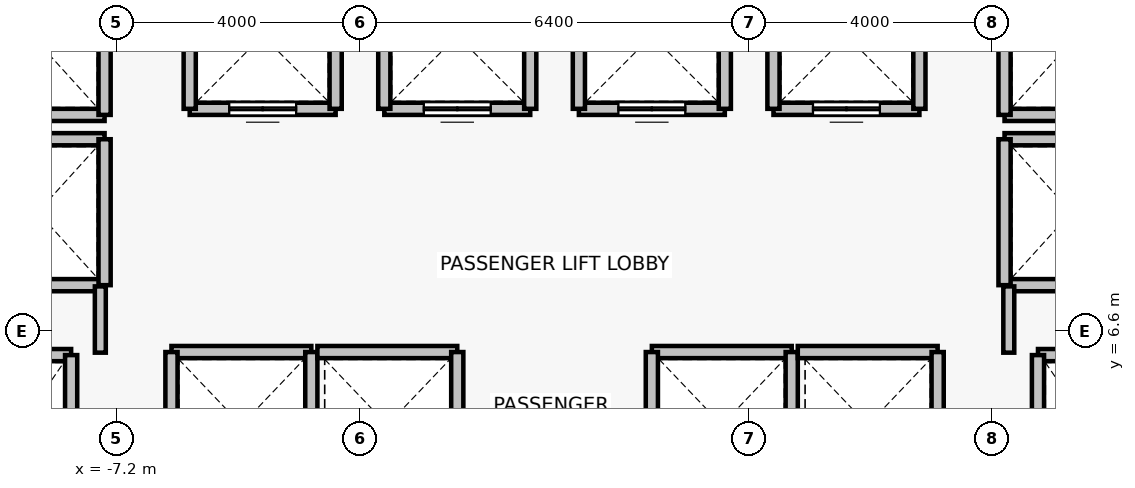
"""IFC4 building model, lengths in metres.
Left out: names, types, materials, properties, quantities, classifications, styles, units other than length and angle.
Written with IfcOpenShell. Run it as: python <this file> out.ifc"""

import sys

from ifc_helpers import new_model, si_unit, direction, frame, frame_2d, origin, place, context, subcontext, project, spatial, rectangle, extrude, source, transform, mapped, element, fill, save


model = new_model("IFC4")
c1 = context("Model", 3, precision=1e-05, world=origin(), true_north=direction((0.0, 1.0)))
c2 = subcontext(c1, "Body", "Model", "MODEL_VIEW")
j1 = project(units=[si_unit("LENGTHUNIT", "METRE"), si_unit("PLANEANGLEUNIT", "RADIAN")], contexts=[c1])
p1 = place(None, origin())
s1 = spatial("IfcSite", under=j1, at=p1, CompositionType="ELEMENT")
p2 = place(p1, origin())
s2 = spatial("IfcBuilding", under=s1, at=p2, CompositionType="ELEMENT")
p3 = place(p2, frame((0.0, 0.0, 37.3)))
s3 = spatial("IfcBuildingStorey", under=s2, at=p3, CompositionType="ELEMENT", Elevation=37.3)
p4 = place(p3, frame((-9.95, 6.2, 0.0), z_axis=(0.0, 0.0, 1.0), x_axis=(1.0, 0.0, 0.0)))
e1 = element("IfcWall", 1, at=p4, inside=s3, PredefinedType="SOLIDWALL", context=c2, shape_type="SweptSolid", body=[
    extrude(rectangle(XDim=2.0, YDim=0.2, at=frame_2d((1.0, 0.0))), origin(), (0.0, 0.0, 1.0), 3.075),
])
p5 = place(p3, frame((-7.95, 6.2, 0.0), z_axis=(0.0, 0.0, 1.0), x_axis=(0.0, -1.0, 0.0)))
e2 = element("IfcWall", 2, at=p5, inside=s3, PredefinedType="SOLIDWALL", context=c2, shape_type="SweptSolid", body=[
    extrude(rectangle(XDim=2.8, YDim=0.2, at=frame_2d((1.4, 0.0))), origin(), (0.0, 0.0, 1.0), 3.075),
])
p6 = place(p3, frame((7.95, 6.2, 0.0), z_axis=(0.0, 0.0, 1.0), x_axis=(1.0, 0.0, 0.0)))
e3 = element("IfcWall", 3, at=p6, inside=s3, PredefinedType="SOLIDWALL", context=c2, shape_type="SweptSolid", body=[
    extrude(rectangle(XDim=2.0, YDim=0.2, at=frame_2d((1.0, 0.0))), origin(), (0.0, 0.0, 1.0), 3.075),
])
p7 = place(p3, frame((7.95, 3.4, 0.0), z_axis=(0.0, 0.0, 1.0), x_axis=(0.0, 1.0, 0.0)))
e4 = element("IfcWall", 4, at=p7, inside=s3, PredefinedType="SOLIDWALL", context=c2, shape_type="SweptSolid", body=[
    extrude(rectangle(XDim=2.8, YDim=0.2, at=frame_2d((1.4, 0.0))), origin(), (0.0, 0.0, 1.0), 3.075),
])
p8 = place(p3, frame((-3.6, 10.25, 0.0), z_axis=(0.0, 0.0, 1.0), x_axis=(-1.0, 0.0, 0.0)))
e5 = element("IfcWall", 5, at=p8, inside=s3, PredefinedType="SOLIDWALL", context=c2, shape_type="SweptSolid", body=[
    extrude(rectangle(XDim=2.4, YDim=0.2, at=frame_2d((1.2, 0.0))), origin(), (0.0, 0.0, 1.0), 3.075),
])
p9 = place(p8, frame((0.65, 0.0, 0.0)))
e6 = element("IfcOpeningElement", 6, at=p9, cuts=e5, PredefinedType="OPENING", context=c2, shape_type="SweptSolid", body=[
    extrude(rectangle(XDim=1.1, YDim=2.2, at=frame_2d((0.55, 1.1))), frame((0.0, 0.11, 0.0), z_axis=(0.0, -1.0, 0.0), x_axis=(1.0, 0.0, 0.0)), (0.0, 0.0, 1.0), 0.22),
])
for number, where, z_axis, x_axis in (
    (7, (-6.0, 10.25, 0.0), (0.0, 0.0, 1.0), (0.0, 1.0, 0.0)),
    (8, (-3.6, 12.65, 0.0), (0.0, 0.0, 1.0), (0.0, -1.0, 0.0)),
):
    element("IfcWall", number, at=place(p3, frame(where, z_axis=z_axis, x_axis=x_axis)), inside=s3, PredefinedType="SOLIDWALL", context=c2, shape_type="SweptSolid", body=[
        extrude(rectangle(XDim=2.4, YDim=0.2, at=frame_2d((1.2, 0.0))), origin(), (0.0, 0.0, 1.0), 3.075),
    ])
p10 = place(p3, frame((-0.4, 10.25, 0.0), z_axis=(0.0, 0.0, 1.0), x_axis=(-1.0, 0.0, 0.0)))
e9 = element("IfcWall", 9, at=p10, inside=s3, PredefinedType="SOLIDWALL", context=c2, shape_type="SweptSolid", body=[
    extrude(rectangle(XDim=2.4, YDim=0.2, at=frame_2d((1.2, 0.0))), origin(), (0.0, 0.0, 1.0), 3.075),
])
p11 = place(p10, frame((0.65, 0.0, 0.0)))
e10 = element("IfcOpeningElement", 10, at=p11, cuts=e9, PredefinedType="OPENING", context=c2, shape_type="SweptSolid", body=[
    extrude(rectangle(XDim=1.1, YDim=2.2, at=frame_2d((0.55, 1.1))), frame((0.0, 0.11, 0.0), z_axis=(0.0, -1.0, 0.0), x_axis=(1.0, 0.0, 0.0)), (0.0, 0.0, 1.0), 0.22),
])
for number, where, z_axis, x_axis in (
    (11, (-2.8, 10.25, 0.0), (0.0, 0.0, 1.0), (0.0, 1.0, 0.0)),
    (12, (-0.4, 12.65, 0.0), (0.0, 0.0, 1.0), (0.0, -1.0, 0.0)),
):
    element("IfcWall", number, at=place(p3, frame(where, z_axis=z_axis, x_axis=x_axis)), inside=s3, PredefinedType="SOLIDWALL", context=c2, shape_type="SweptSolid", body=[
        extrude(rectangle(XDim=2.4, YDim=0.2, at=frame_2d((1.2, 0.0))), origin(), (0.0, 0.0, 1.0), 3.075),
    ])
p12 = place(p3, frame((2.8, 10.25, 0.0), z_axis=(0.0, 0.0, 1.0), x_axis=(-1.0, 0.0, 0.0)))
e13 = element("IfcWall", 13, at=p12, inside=s3, PredefinedType="SOLIDWALL", context=c2, shape_type="SweptSolid", body=[
    extrude(rectangle(XDim=2.4, YDim=0.2, at=frame_2d((1.2, 0.0))), origin(), (0.0, 0.0, 1.0), 3.075),
])
p13 = place(p12, frame((0.65, 0.0, 0.0)))
e14 = element("IfcOpeningElement", 14, at=p13, cuts=e13, PredefinedType="OPENING", context=c2, shape_type="SweptSolid", body=[
    extrude(rectangle(XDim=1.1, YDim=2.2, at=frame_2d((0.55, 1.1))), frame((0.0, 0.11, 0.0), z_axis=(0.0, -1.0, 0.0), x_axis=(1.0, 0.0, 0.0)), (0.0, 0.0, 1.0), 0.22),
])
for number, where, z_axis, x_axis in (
    (15, (0.4, 10.25, 0.0), (0.0, 0.0, 1.0), (0.0, 1.0, 0.0)),
    (16, (2.8, 12.65, 0.0), (0.0, 0.0, 1.0), (0.0, -1.0, 0.0)),
):
    element("IfcWall", number, at=place(p3, frame(where, z_axis=z_axis, x_axis=x_axis)), inside=s3, PredefinedType="SOLIDWALL", context=c2, shape_type="SweptSolid", body=[
        extrude(rectangle(XDim=2.4, YDim=0.2, at=frame_2d((1.2, 0.0))), origin(), (0.0, 0.0, 1.0), 3.075),
    ])
p14 = place(p3, frame((6.0, 10.25, 0.0), z_axis=(0.0, 0.0, 1.0), x_axis=(-1.0, 0.0, 0.0)))
e17 = element("IfcWall", 17, at=p14, inside=s3, PredefinedType="SOLIDWALL", context=c2, shape_type="SweptSolid", body=[
    extrude(rectangle(XDim=2.4, YDim=0.2, at=frame_2d((1.2, 0.0))), origin(), (0.0, 0.0, 1.0), 3.075),
])
p15 = place(p14, frame((0.65, 0.0, 0.0)))
e18 = element("IfcOpeningElement", 18, at=p15, cuts=e17, PredefinedType="OPENING", context=c2, shape_type="SweptSolid", body=[
    extrude(rectangle(XDim=1.1, YDim=2.2, at=frame_2d((0.55, 1.1))), frame((0.0, 0.11, 0.0), z_axis=(0.0, -1.0, 0.0), x_axis=(1.0, 0.0, 0.0)), (0.0, 0.0, 1.0), 0.22),
])
for number, where, z_axis, x_axis in (
    (19, (3.6, 10.25, 0.0), (0.0, 0.0, 1.0), (0.0, 1.0, 0.0)),
    (20, (6.0, 12.65, 0.0), (0.0, 0.0, 1.0), (0.0, -1.0, 0.0)),
):
    element("IfcWall", number, at=place(p3, frame(where, z_axis=z_axis, x_axis=x_axis)), inside=s3, PredefinedType="SOLIDWALL", context=c2, shape_type="SweptSolid", body=[
        extrude(rectangle(XDim=2.4, YDim=0.2, at=frame_2d((1.2, 0.0))), origin(), (0.0, 0.0, 1.0), 3.075),
    ])
p16 = place(p3, frame((-6.3, 6.25, 0.0), z_axis=(0.0, 0.0, 1.0), x_axis=(1.0, 0.0, 0.0)))
e21 = element("IfcWall", 21, at=p16, inside=s3, PredefinedType="SOLIDWALL", context=c2, shape_type="SweptSolid", body=[
    extrude(rectangle(XDim=2.3, YDim=0.2, at=frame_2d((1.15, 0.0))), origin(), (0.0, 0.0, 1.0), 3.075),
])
for number, where, z_axis, x_axis in (
    (22, (-6.3, 3.85, 0.0), (0.0, 0.0, 1.0), (0.0, 1.0, 0.0)),
    (23, (-4.0, 6.25, 0.0), (0.0, 0.0, 1.0), (0.0, -1.0, 0.0)),
):
    element("IfcWall", number, at=place(p3, frame(where, z_axis=z_axis, x_axis=x_axis)), inside=s3, PredefinedType="SOLIDWALL", context=c2, shape_type="SweptSolid", body=[
        extrude(rectangle(XDim=2.4, YDim=0.2, at=frame_2d((1.2, 0.0))), origin(), (0.0, 0.0, 1.0), 3.075),
    ])
p17 = place(p3, frame((-3.9, 6.25, 0.0), z_axis=(0.0, 0.0, 1.0), x_axis=(1.0, 0.0, 0.0)))
e24 = element("IfcWall", 24, at=p17, inside=s3, PredefinedType="SOLIDWALL", context=c2, shape_type="SweptSolid", body=[
    extrude(rectangle(XDim=2.3, YDim=0.2, at=frame_2d((1.15, 0.0))), origin(), (0.0, 0.0, 1.0), 3.075),
])
p18 = place(p3, frame((-1.6, 6.25, 0.0), z_axis=(0.0, 0.0, 1.0), x_axis=(0.0, -1.0, 0.0)))
e25 = element("IfcWall", 25, at=p18, inside=s3, PredefinedType="SOLIDWALL", context=c2, shape_type="SweptSolid", body=[
    extrude(rectangle(XDim=2.4, YDim=0.2, at=frame_2d((1.2, 0.0))), origin(), (0.0, 0.0, 1.0), 3.075),
])
p19 = place(p3, frame((1.6, 6.25, 0.0), z_axis=(0.0, 0.0, 1.0), x_axis=(1.0, 0.0, 0.0)))
e26 = element("IfcWall", 26, at=p19, inside=s3, PredefinedType="SOLIDWALL", context=c2, shape_type="SweptSolid", body=[
    extrude(rectangle(XDim=2.3, YDim=0.2, at=frame_2d((1.15, 0.0))), origin(), (0.0, 0.0, 1.0), 3.075),
])
for number, where, z_axis, x_axis in (
    (27, (1.6, 3.85, 0.0), (0.0, 0.0, 1.0), (0.0, 1.0, 0.0)),
    (28, (3.9, 6.25, 0.0), (0.0, 0.0, 1.0), (0.0, -1.0, 0.0)),
):
    element("IfcWall", number, at=place(p3, frame(where, z_axis=z_axis, x_axis=x_axis)), inside=s3, PredefinedType="SOLIDWALL", context=c2, shape_type="SweptSolid", body=[
        extrude(rectangle(XDim=2.4, YDim=0.2, at=frame_2d((1.2, 0.0))), origin(), (0.0, 0.0, 1.0), 3.075),
    ])
p20 = place(p3, frame((4.0, 6.25, 0.0), z_axis=(0.0, 0.0, 1.0), x_axis=(1.0, 0.0, 0.0)))
e29 = element("IfcWall", 29, at=p20, inside=s3, PredefinedType="SOLIDWALL", context=c2, shape_type="SweptSolid", body=[
    extrude(rectangle(XDim=2.3, YDim=0.2, at=frame_2d((1.15, 0.0))), origin(), (0.0, 0.0, 1.0), 3.075),
])
p21 = place(p3, frame((6.3, 6.25, 0.0), z_axis=(0.0, 0.0, 1.0), x_axis=(0.0, -1.0, 0.0)))
e30 = element("IfcWall", 30, at=p21, inside=s3, PredefinedType="SOLIDWALL", context=c2, shape_type="SweptSolid", body=[
    extrude(rectangle(XDim=2.4, YDim=0.2, at=frame_2d((1.2, 0.0))), origin(), (0.0, 0.0, 1.0), 3.075),
])
for number, where, z_axis, x_axis in (
    (31, (-7.4, 7.35, 0.0), (0.0, 0.0, 1.0), (-1.0, 0.0, 0.0)),
    (32, (-9.6, 9.75, 0.0), (0.0, 0.0, 1.0), (1.0, 0.0, 0.0)),
):
    element("IfcWall", number, at=place(p3, frame(where, z_axis=z_axis, x_axis=x_axis)), inside=s3, PredefinedType="SOLIDWALL", context=c2, shape_type="SweptSolid", body=[
        extrude(rectangle(XDim=2.2, YDim=0.2, at=frame_2d((1.1, 0.0))), origin(), (0.0, 0.0, 1.0), 2.465),
    ])
p22 = place(p3, frame((-7.4, 9.75, 0.0), z_axis=(0.0, 0.0, 1.0), x_axis=(0.0, -1.0, 0.0)))
e33 = element("IfcWall", 33, at=p22, inside=s3, PredefinedType="SOLIDWALL", context=c2, shape_type="SweptSolid", body=[
    extrude(rectangle(XDim=2.4, YDim=0.2, at=frame_2d((1.2, 0.0))), origin(), (0.0, 0.0, 1.0), 2.465),
])
p23 = place(p3, frame((-7.4, 10.15, 0.0), z_axis=(0.0, 0.0, 1.0), x_axis=(-1.0, 0.0, 0.0)))
e34 = element("IfcWall", 34, at=p23, inside=s3, PredefinedType="SOLIDWALL", context=c2, shape_type="SweptSolid", body=[
    extrude(rectangle(XDim=2.2, YDim=0.2, at=frame_2d((1.1, 0.0))), origin(), (0.0, 0.0, 1.0), 2.465),
])
p24 = place(p3, frame((-7.4, 12.55, 0.0), z_axis=(0.0, 0.0, 1.0), x_axis=(0.0, -1.0, 0.0)))
e35 = element("IfcWall", 35, at=p24, inside=s3, PredefinedType="SOLIDWALL", context=c2, shape_type="SweptSolid", body=[
    extrude(rectangle(XDim=2.4, YDim=0.2, at=frame_2d((1.2, 0.0))), origin(), (0.0, 0.0, 1.0), 2.465),
])
for number, where, z_axis, x_axis in (
    (36, (9.6, 7.35, 0.0), (0.0, 0.0, 1.0), (-1.0, 0.0, 0.0)),
    (37, (7.4, 9.75, 0.0), (0.0, 0.0, 1.0), (1.0, 0.0, 0.0)),
):
    element("IfcWall", number, at=place(p3, frame(where, z_axis=z_axis, x_axis=x_axis)), inside=s3, PredefinedType="SOLIDWALL", context=c2, shape_type="SweptSolid", body=[
        extrude(rectangle(XDim=2.2, YDim=0.2, at=frame_2d((1.1, 0.0))), origin(), (0.0, 0.0, 1.0), 2.465),
    ])
p25 = place(p3, frame((7.4, 7.35, 0.0), z_axis=(0.0, 0.0, 1.0), x_axis=(0.0, 1.0, 0.0)))
e38 = element("IfcWall", 38, at=p25, inside=s3, PredefinedType="SOLIDWALL", context=c2, shape_type="SweptSolid", body=[
    extrude(rectangle(XDim=2.4, YDim=0.2, at=frame_2d((1.2, 0.0))), origin(), (0.0, 0.0, 1.0), 2.465),
])
p26 = place(p3, frame((9.6, 10.15, 0.0), z_axis=(0.0, 0.0, 1.0), x_axis=(-1.0, 0.0, 0.0)))
e39 = element("IfcWall", 39, at=p26, inside=s3, PredefinedType="SOLIDWALL", context=c2, shape_type="SweptSolid", body=[
    extrude(rectangle(XDim=2.2, YDim=0.2, at=frame_2d((1.1, 0.0))), origin(), (0.0, 0.0, 1.0), 2.465),
])
p27 = place(p3, frame((7.4, 10.15, 0.0), z_axis=(0.0, 0.0, 1.0), x_axis=(0.0, 1.0, 0.0)))
e40 = element("IfcWall", 40, at=p27, inside=s3, PredefinedType="SOLIDWALL", context=c2, shape_type="SweptSolid", body=[
    extrude(rectangle(XDim=2.4, YDim=0.2, at=frame_2d((1.2, 0.0))), origin(), (0.0, 0.0, 1.0), 2.465),
])
for number, where, z_axis, x_axis in (
    (41, (-7.47, 7.33, 0.0), (0.0, 0.0, 1.0), (0.0, -1.0, 0.0)),
    (42, (7.47, 6.24, 0.0), (0.0, 0.0, 1.0), (0.0, 1.0, 0.0)),
):
    element("IfcWall", number, at=place(p3, frame(where, z_axis=z_axis, x_axis=x_axis)), inside=s3, PredefinedType="PARTITIONING", context=c2, shape_type="SweptSolid", body=[
        extrude(rectangle(XDim=1.09, YDim=0.18, at=frame_2d((0.545, 0.0))), origin(), (0.0, 0.0, 1.0), 2.465),
    ])
m1 = source(origin(), c2, "Body", "SweptSolid", [
    extrude(rectangle(XDim=1.1, YDim=2.2, at=frame_2d((0.55, 1.1))), frame((0.0, 0.025, 0.0), z_axis=(0.0, -1.0, 0.0), x_axis=(1.0, 0.0, 0.0)), (0.0, 0.0, 1.0), 0.05),
])
p28 = place(p9, origin())
e43 = element("IfcDoor", 43, at=p28, inside=s3, OperationType="DOUBLE_DOOR_SLIDING", PredefinedType="DOOR", context=c2, shape_type="MappedRepresentation", body=[
    mapped(m1, transform((0.0, 0.0, 0.0), x_axis=(1.0, 0.0, 0.0), y_axis=(0.0, 1.0, 0.0), z_axis=(0.0, 0.0, 1.0), scale=1.0)),
])
fill(e6, e43)
p29 = place(p11, origin())
e44 = element("IfcDoor", 44, at=p29, inside=s3, OperationType="DOUBLE_DOOR_SLIDING", PredefinedType="DOOR", context=c2, shape_type="MappedRepresentation", body=[
    mapped(m1, transform((0.0, 0.0, 0.0), x_axis=(1.0, 0.0, 0.0), y_axis=(0.0, 1.0, 0.0), z_axis=(0.0, 0.0, 1.0), scale=1.0)),
])
fill(e10, e44)
p30 = place(p13, origin())
e45 = element("IfcDoor", 45, at=p30, inside=s3, OperationType="DOUBLE_DOOR_SLIDING", PredefinedType="DOOR", context=c2, shape_type="MappedRepresentation", body=[
    mapped(m1, transform((0.0, 0.0, 0.0), x_axis=(1.0, 0.0, 0.0), y_axis=(0.0, 1.0, 0.0), z_axis=(0.0, 0.0, 1.0), scale=1.0)),
])
fill(e14, e45)
p31 = place(p15, origin())
e46 = element("IfcDoor", 46, at=p31, inside=s3, OperationType="DOUBLE_DOOR_SLIDING", PredefinedType="DOOR", context=c2, shape_type="MappedRepresentation", body=[
    mapped(m1, transform((0.0, 0.0, 0.0), x_axis=(1.0, 0.0, 0.0), y_axis=(0.0, 1.0, 0.0), z_axis=(0.0, 0.0, 1.0), scale=1.0)),
])
fill(e18, e46)
save(model, sys.argv[1])
